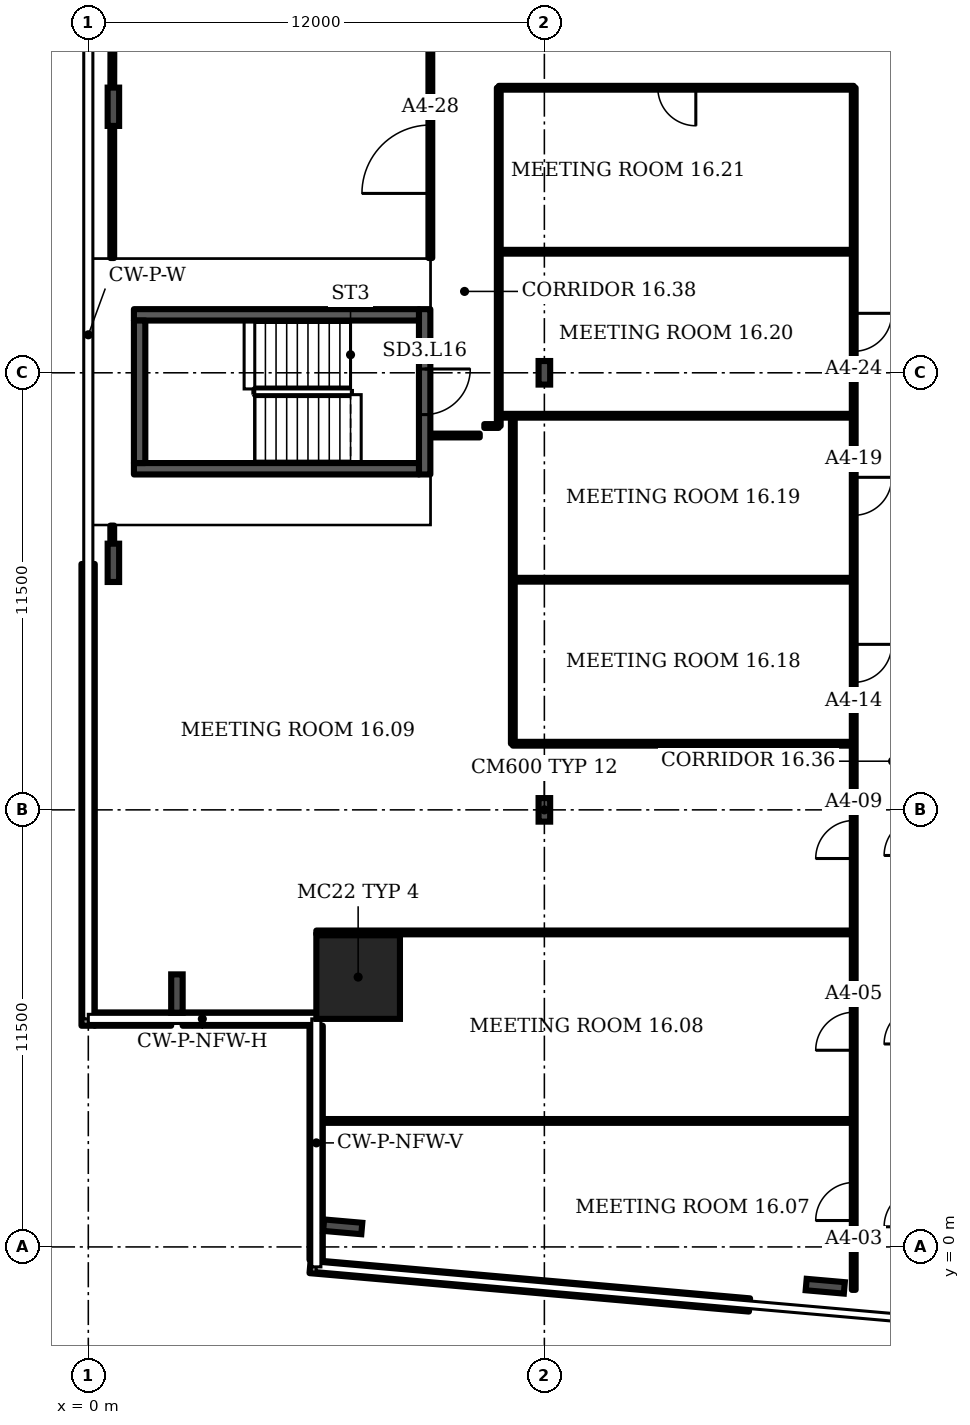
"""IFC4 building model, lengths in metres.
Left out: names, types, materials, properties, quantities, classifications, styles, units other than length and angle.
Written with IfcOpenShell. Run it as: python <this file> out.ifc"""

import sys

from ifc_helpers import new_model, si_unit, direction, frame, frame_2d, origin, origin_2d, place, context, subcontext, project, spatial, rectangle, i_section, extrude, element, fill, save


model = new_model("IFC4")
c1 = context("Model", 3, precision=1e-05, world=origin(), true_north=direction((0.0, 1.0)))
c2 = subcontext(c1, "Body", "Model", "MODEL_VIEW")
j1 = project(units=[si_unit("LENGTHUNIT", "METRE"), si_unit("PLANEANGLEUNIT", "RADIAN")], contexts=[c1])
p1 = place(None, origin())
s1 = spatial("IfcSite", under=j1, at=p1, CompositionType="ELEMENT")
p2 = place(p1, origin())
s2 = spatial("IfcBuilding", under=s1, at=p2, CompositionType="ELEMENT")
p3 = place(p2, frame((0.0, 0.0, 77.5)))
s3 = spatial("IfcBuildingStorey", under=s2, at=p3, CompositionType="ELEMENT", Elevation=77.5)
p4 = place(p3, frame((7.1, 7.1, 0.0), z_axis=(0.0, 0.0, 1.0), x_axis=(1.0, 0.0, 0.0)))
e1 = element("IfcColumn", 1, at=p4, inside=s3, PredefinedType="COLUMN", context=c2, shape_type="SweptSolid", body=[
    extrude(rectangle(XDim=2.2, YDim=2.2, at=origin_2d()), origin(), (0.0, 0.0, 1.0), 3.6),
])
for number, where, z_axis, x_axis in (
    (2, (6.694, 0.529, 0.0), (0.0, 0.0, 1.0), (-0.087, -0.996, 0.0)),
    (3, (19.391, -1.034, 0.0), (0.0, 0.0, 1.0), (-0.087, -0.996, 0.0)),
    (4, (0.66, 30.0, 0.0), (0.0, 0.0, 1.0), (-1.0, 0.0, 0.0)),
    (5, (0.66, 18.0, 0.0), (0.0, 0.0, 1.0), (-1.0, 0.0, 0.0)),
    (6, (2.332, 6.667, 0.0), (0.0, 0.0, 1.0), (-1.0, 0.0, 0.0)),
):
    element("IfcColumn", number, at=place(p3, frame(where, z_axis=z_axis, x_axis=x_axis)), inside=s3, PredefinedType="COLUMN", context=c2, shape_type="SweptSolid", body=[
        extrude(i_section(OverallWidth=0.302, OverallDepth=1.008, WebThickness=0.021, FlangeThickness=0.04, FilletRadius=0.03, at=origin_2d()), origin(), (0.0, 0.0, 1.0), 3.6),
    ])
for number, where, z_axis, x_axis in (
    (7, (12.0, 11.5, 0.0), (0.0, 0.0, 1.0), (1.0, 0.0, 0.0)),
    (8, (12.0, 23.0, 0.0), (0.0, 0.0, 1.0), (1.0, 0.0, 0.0)),
):
    element("IfcColumn", number, at=place(p3, frame(where, z_axis=z_axis, x_axis=x_axis)), inside=s3, PredefinedType="COLUMN", context=c2, shape_type="SweptSolid", body=[
        extrude(i_section(OverallWidth=0.305, OverallDepth=0.62, WebThickness=0.021, FlangeThickness=0.04, FilletRadius=0.027, at=origin_2d()), origin(), (0.0, 0.0, 1.0), 3.6),
    ])
p5 = place(p3, frame((5.835, -0.516, 0.0), z_axis=(0.0, 0.0, 1.0), x_axis=(0.996192, -0.087142, 0.0)))
e9 = element("IfcWall", 9, at=p5, inside=s3, PredefinedType="SOLIDWALL", context=c2, shape_type="SweptSolid", body=[
    extrude(rectangle(XDim=11.607, YDim=0.35, at=frame_2d((5.804, 0.0))), origin(), (0.0, 0.0, 1.0), 1.0),
])
p6 = place(p3, frame((-0.005, 17.97, 0.0), z_axis=(0.0, 0.0, 1.0), x_axis=(0.0, -1.0, 0.0)))
e10 = element("IfcWall", 10, at=p6, inside=s3, PredefinedType="SOLIDWALL", context=c2, shape_type="SweptSolid", body=[
    extrude(rectangle(XDim=12.15, YDim=0.35, at=frame_2d((6.075, 0.0))), origin(), (0.0, 0.0, 1.0), 1.0),
])
p7 = place(p3, frame((0.17, 5.995, 0.0), z_axis=(0.0, 0.0, 1.0), x_axis=(1.0, 0.0, 0.0)))
e11 = element("IfcWall", 11, at=p7, inside=s3, PredefinedType="SOLIDWALL", context=c2, shape_type="SweptSolid", body=[
    extrude(rectangle(XDim=2.011, YDim=0.35, at=frame_2d((1.005, 0.0))), origin(), (0.0, 0.0, 1.0), 1.0),
])
p8 = place(p3, frame((2.483, 5.995, 0.0), z_axis=(0.0, 0.0, 1.0), x_axis=(1.0, 0.0, 0.0)))
e12 = element("IfcWall", 12, at=p8, inside=s3, PredefinedType="SOLIDWALL", context=c2, shape_type="SweptSolid", body=[
    extrude(rectangle(XDim=3.517, YDim=0.35, at=frame_2d((1.759, 0.0))), origin(), (0.0, 0.0, 1.0), 1.0),
])
p9 = place(p3, frame((5.995, 5.82, 0.0), z_axis=(0.0, 0.0, 1.0), x_axis=(0.0, -1.0, 0.0)))
e13 = element("IfcWall", 13, at=p9, inside=s3, PredefinedType="SOLIDWALL", context=c2, shape_type="SweptSolid", body=[
    extrude(rectangle(XDim=6.161, YDim=0.35, at=frame_2d((3.081, 0.0))), origin(), (0.0, 0.0, 1.0), 1.0),
])
p10 = place(p3, frame((8.85, 20.325, 0.0), z_axis=(0.0, 0.0, 1.0), x_axis=(0.0, 1.0, 0.0)))
e14 = element("IfcWall", 14, at=p10, inside=s3, PredefinedType="SHEAR", context=c2, shape_type="SweptSolid", body=[
    extrude(rectangle(XDim=4.35, YDim=0.3, at=frame_2d((2.175, 0.0))), origin(), (0.0, 0.0, 1.0), 3.2),
])
p11 = place(p10, frame((1.575, 0.0, 0.0)))
e15 = element("IfcOpeningElement", 15, at=p11, cuts=e14, PredefinedType="OPENING", context=c2, shape_type="SweptSolid", body=[
    extrude(rectangle(XDim=1.2, YDim=2.1, at=frame_2d((0.6, 1.05))), frame((0.0, 0.16, 0.0), z_axis=(0.0, -1.0, 0.0), x_axis=(1.0, 0.0, 0.0)), (0.0, 0.0, 1.0), 0.32),
])
p12 = place(p3, frame((0.63, 17.5, 0.0), z_axis=(0.0, 0.0, 1.0), x_axis=(0.0, 1.0, 0.0)))
e16 = element("IfcWall", 16, at=p12, inside=s3, PredefinedType="PARTITIONING", context=c2, shape_type="SweptSolid", body=[
    extrude(rectangle(XDim=1.48, YDim=0.1, at=frame_2d((0.74, 0.0))), origin(), (0.0, 0.0, 1.0), 2.58),
])
p13 = place(p3, frame((0.63, 26.02, 0.0), z_axis=(0.0, 0.0, 1.0), x_axis=(0.0, 1.0, 0.0)))
e17 = element("IfcWall", 17, at=p13, inside=s3, PredefinedType="PARTITIONING", context=c2, shape_type="SweptSolid", body=[
    extrude(rectangle(XDim=3.98, YDim=0.1, at=frame_2d((1.99, 0.0))), origin(), (0.0, 0.0, 1.0), 2.58),
])
p14 = place(p3, frame((0.63, 30.0, 0.0), z_axis=(0.0, 0.0, 1.0), x_axis=(0.00218, 0.999994, 0.0)))
e18 = element("IfcWall", 18, at=p14, inside=s3, PredefinedType="PARTITIONING", context=c2, shape_type="SweptSolid", body=[
    extrude(rectangle(XDim=11.535, YDim=0.1, at=frame_2d((5.768, 0.0))), origin(), (0.0, 0.0, 1.0), 2.58),
])
p15 = place(p3, frame((6.0, 8.275, 0.0), z_axis=(0.0, 0.0, 1.0), x_axis=(1.0, 0.0, 0.0)))
e19 = element("IfcWall", 19, at=p15, inside=s3, PredefinedType="PARTITIONING", context=c2, shape_type="SweptSolid", body=[
    extrude(rectangle(XDim=14.14, YDim=0.1, at=frame_2d((7.07, 0.0))), origin(), (0.0, 0.0, 1.0), 3.2),
])
p16 = place(p3, frame((6.02, 3.315, 0.0), z_axis=(0.0, 0.0, 1.0), x_axis=(1.0, 0.0, 0.0)))
e20 = element("IfcWall", 20, at=p16, inside=s3, PredefinedType="PARTITIONING", context=c2, shape_type="SweptSolid", body=[
    extrude(rectangle(XDim=14.12, YDim=0.1, at=frame_2d((7.06, 0.0))), origin(), (0.0, 0.0, 1.0), 3.2),
])
p17 = place(p3, frame((9.0, 26.02, 0.0), z_axis=(0.0, 0.0, 1.0), x_axis=(0.0, 1.0, 0.0)))
e21 = element("IfcWall", 21, at=p17, inside=s3, PredefinedType="PARTITIONING", context=c2, shape_type="SweptSolid", body=[
    extrude(rectangle(XDim=7.96, YDim=0.1, at=frame_2d((3.98, 0.0))), origin(), (0.0, 0.0, 1.0), 3.2),
])
p18 = place(p17, frame((1.7, 0.0, 0.0)))
e22 = element("IfcOpeningElement", 22, at=p18, cuts=e21, PredefinedType="OPENING", context=c2, shape_type="SweptSolid", body=[
    extrude(rectangle(XDim=1.8, YDim=2.1, at=frame_2d((0.9, 1.05))), frame((0.0, 0.06, 0.0), z_axis=(0.0, -1.0, 0.0), x_axis=(1.0, 0.0, 0.0)), (0.0, 0.0, 1.0), 0.12),
])
p19 = place(p3, frame((9.02, 21.35, 0.0), z_axis=(0.0, 0.0, 1.0), x_axis=(1.0, 0.0, 0.0)))
e23 = element("IfcWall", 23, at=p19, inside=s3, PredefinedType="PARTITIONING", context=c2, shape_type="SweptSolid", body=[
    extrude(rectangle(XDim=1.28, YDim=0.1, at=frame_2d((0.64, 0.0))), origin(), (0.0, 0.0, 1.0), 3.2),
])
p20 = place(p3, frame((10.42, 21.6, 0.0), z_axis=(0.0, 0.0, 1.0), x_axis=(1.0, 0.0, 0.0)))
e24 = element("IfcWall", 24, at=p20, inside=s3, PredefinedType="PARTITIONING", context=c2, shape_type="SweptSolid", body=[
    extrude(rectangle(XDim=0.38, YDim=0.1, at=frame_2d((0.19, 0.0))), origin(), (0.0, 0.0, 1.0), 3.2),
])
p21 = place(p3, frame((10.8, 21.6, 0.0), z_axis=(0.0, 0.0, 1.0), x_axis=(0.0, 1.0, 0.0)))
e25 = element("IfcWall", 25, at=p21, inside=s3, PredefinedType="PARTITIONING", context=c2, shape_type="SweptSolid", body=[
    extrude(rectangle(XDim=8.9, YDim=0.1, at=frame_2d((4.45, 0.0))), origin(), (0.0, 0.0, 1.0), 3.2),
])
for number, where, z_axis, x_axis in (
    (26, (10.8, 21.87, 0.0), (0.0, 0.0, 1.0), (1.0, 0.0, 0.0)),
    (27, (10.8, 26.185, 0.0), (0.0, 0.0, 1.0), (1.0, 0.0, 0.0)),
):
    element("IfcWall", number, at=place(p3, frame(where, z_axis=z_axis, x_axis=x_axis)), inside=s3, PredefinedType="PARTITIONING", context=c2, shape_type="SweptSolid", body=[
        extrude(rectangle(XDim=9.34, YDim=0.1, at=frame_2d((4.67, 0.0))), origin(), (0.0, 0.0, 1.0), 3.2),
    ])
p22 = place(p3, frame((10.8, 30.5, 0.0), z_axis=(0.0, 0.0, 1.0), x_axis=(1.0, 0.0, 0.0)))
e28 = element("IfcWall", 28, at=p22, inside=s3, PredefinedType="PARTITIONING", context=c2, shape_type="SweptSolid", body=[
    extrude(rectangle(XDim=9.34, YDim=0.1, at=frame_2d((4.67, 0.0))), origin(), (0.0, 0.0, 1.0), 3.2),
])
p23 = place(p22, frame((4.185, 0.0, 0.0)))
e29 = element("IfcOpeningElement", 29, at=p23, cuts=e28, PredefinedType="OPENING", context=c2, shape_type="SweptSolid", body=[
    extrude(rectangle(XDim=1.0, YDim=2.1, at=frame_2d((0.5, 1.05))), frame((0.0, 0.06, 0.0), z_axis=(0.0, -1.0, 0.0), x_axis=(1.0, 0.0, 0.0)), (0.0, 0.0, 1.0), 0.12),
])
p24 = place(p3, frame((11.17, 13.24, 0.0), z_axis=(0.0, 0.0, 1.0), x_axis=(0.0, 1.0, 0.0)))
e30 = element("IfcWall", 30, at=p24, inside=s3, PredefinedType="PARTITIONING", context=c2, shape_type="SweptSolid", body=[
    extrude(rectangle(XDim=8.63, YDim=0.1, at=frame_2d((4.315, 0.0))), origin(), (0.0, 0.0, 1.0), 3.2),
])
for number, where, z_axis, x_axis in (
    (31, (11.17, 13.24, 0.0), (0.0, 0.0, 1.0), (1.0, 0.0, 0.0)),
    (32, (11.17, 17.555, 0.0), (0.0, 0.0, 1.0), (1.0, 0.0, 0.0)),
):
    element("IfcWall", number, at=place(p3, frame(where, z_axis=z_axis, x_axis=x_axis)), inside=s3, PredefinedType="PARTITIONING", context=c2, shape_type="SweptSolid", body=[
        extrude(rectangle(XDim=8.97, YDim=0.1, at=frame_2d((4.485, 0.0))), origin(), (0.0, 0.0, 1.0), 3.2),
    ])
p25 = place(p3, frame((20.14, -1.13, 0.0), z_axis=(0.0, 0.0, 1.0), x_axis=(0.0, 1.0, 0.0)))
e33 = element("IfcWall", 33, at=p25, inside=s3, PredefinedType="PARTITIONING", context=c2, shape_type="SweptSolid", body=[
    extrude(rectangle(XDim=31.63, YDim=0.1, at=frame_2d((15.815, 0.0))), origin(), (0.0, 0.0, 1.0), 3.2),
])
p26 = place(p25, frame((1.825, 0.0, 0.0)))
e34 = element("IfcOpeningElement", 34, at=p26, cuts=e33, PredefinedType="OPENING", context=c2, shape_type="SweptSolid", body=[
    extrude(rectangle(XDim=1.0, YDim=2.1, at=frame_2d((0.5, 1.05))), frame((0.0, 0.06, 0.0), z_axis=(0.0, -1.0, 0.0), x_axis=(1.0, 0.0, 0.0)), (0.0, 0.0, 1.0), 0.12),
])
p27 = place(p25, frame((6.305, 0.0, 0.0)))
e35 = element("IfcOpeningElement", 35, at=p27, cuts=e33, PredefinedType="OPENING", context=c2, shape_type="SweptSolid", body=[
    extrude(rectangle(XDim=1.0, YDim=2.1, at=frame_2d((0.5, 1.05))), frame((0.0, 0.06, 0.0), z_axis=(0.0, -1.0, 0.0), x_axis=(1.0, 0.0, 0.0)), (0.0, 0.0, 1.0), 0.12),
])
p28 = place(p25, frame((11.35, 0.0, 0.0)))
e36 = element("IfcOpeningElement", 36, at=p28, cuts=e33, PredefinedType="OPENING", context=c2, shape_type="SweptSolid", body=[
    extrude(rectangle(XDim=1.0, YDim=2.1, at=frame_2d((0.5, 1.05))), frame((0.0, 0.06, 0.0), z_axis=(0.0, -1.0, 0.0), x_axis=(1.0, 0.0, 0.0)), (0.0, 0.0, 1.0), 0.12),
])
p29 = place(p25, frame((15.985, 0.0, 0.0)))
e37 = element("IfcOpeningElement", 37, at=p29, cuts=e33, PredefinedType="OPENING", context=c2, shape_type="SweptSolid", body=[
    extrude(rectangle(XDim=1.0, YDim=2.1, at=frame_2d((0.5, 1.05))), frame((0.0, 0.06, 0.0), z_axis=(0.0, -1.0, 0.0), x_axis=(1.0, 0.0, 0.0)), (0.0, 0.0, 1.0), 0.12),
])
p30 = place(p25, frame((20.38, 0.0, 0.0)))
e38 = element("IfcOpeningElement", 38, at=p30, cuts=e33, PredefinedType="OPENING", context=c2, shape_type="SweptSolid", body=[
    extrude(rectangle(XDim=1.0, YDim=2.1, at=frame_2d((0.5, 1.05))), frame((0.0, 0.06, 0.0), z_axis=(0.0, -1.0, 0.0), x_axis=(1.0, 0.0, 0.0)), (0.0, 0.0, 1.0), 0.12),
])
p31 = place(p25, frame((24.695, 0.0, 0.0)))
e39 = element("IfcOpeningElement", 39, at=p31, cuts=e33, PredefinedType="OPENING", context=c2, shape_type="SweptSolid", body=[
    extrude(rectangle(XDim=1.0, YDim=2.1, at=frame_2d((0.5, 1.05))), frame((0.0, 0.06, 0.0), z_axis=(0.0, -1.0, 0.0), x_axis=(1.0, 0.0, 0.0)), (0.0, 0.0, 1.0), 0.12),
])
for number, where, z_axis, x_axis in (
    (40, (1.2, 20.475, 0.0), (0.0, 0.0, 1.0), (1.0, 0.0, 0.0)),
    (41, (1.2, 24.525, 0.0), (0.0, 0.0, 1.0), (1.0, 0.0, 0.0)),
):
    element("IfcWall", number, at=place(p3, frame(where, z_axis=z_axis, x_axis=x_axis)), inside=s3, PredefinedType="SHEAR", context=c2, shape_type="SweptSolid", body=[
        extrude(rectangle(XDim=7.5, YDim=0.3, at=frame_2d((3.75, 0.0))), origin(), (0.0, 0.0, 1.0), 3.2),
    ])
p32 = place(p3, frame((1.35, 20.625, 0.0), z_axis=(0.0, 0.0, 1.0), x_axis=(0.0, 1.0, 0.0)))
e42 = element("IfcWall", 42, at=p32, inside=s3, PredefinedType="SHEAR", context=c2, shape_type="SweptSolid", body=[
    extrude(rectangle(XDim=3.75, YDim=0.3, at=frame_2d((1.875, 0.0))), origin(), (0.0, 0.0, 1.0), 3.2),
])
p33 = place(p11, origin())
e43 = element("IfcDoor", 43, at=p33, inside=s3, OperationType="SINGLE_SWING_RIGHT", PredefinedType="DOOR", context=c2, shape_type="SweptSolid", body=[
    extrude(rectangle(XDim=1.2, YDim=2.1, at=frame_2d((0.6, 1.05))), frame((0.0, 0.025, 0.0), z_axis=(0.0, -1.0, 0.0), x_axis=(1.0, 0.0, 0.0)), (0.0, 0.0, 1.0), 0.05),
])
fill(e15, e43)
p34 = place(p26, origin())
e44 = element("IfcDoor", 44, at=p34, inside=s3, OperationType="SINGLE_SWING_LEFT", PredefinedType="DOOR", context=c2, shape_type="SweptSolid", body=[
    extrude(rectangle(XDim=1.0, YDim=2.1, at=frame_2d((0.5, 1.05))), frame((0.0, 0.025, 0.0), z_axis=(0.0, -1.0, 0.0), x_axis=(1.0, 0.0, 0.0)), (0.0, 0.0, 1.0), 0.05),
])
fill(e34, e44)
p35 = place(p27, origin())
e45 = element("IfcDoor", 45, at=p35, inside=s3, OperationType="SINGLE_SWING_LEFT", PredefinedType="DOOR", context=c2, shape_type="SweptSolid", body=[
    extrude(rectangle(XDim=1.0, YDim=2.1, at=frame_2d((0.5, 1.05))), frame((0.0, 0.025, 0.0), z_axis=(0.0, -1.0, 0.0), x_axis=(1.0, 0.0, 0.0)), (0.0, 0.0, 1.0), 0.05),
])
fill(e35, e45)
p36 = place(p28, origin())
e46 = element("IfcDoor", 46, at=p36, inside=s3, OperationType="SINGLE_SWING_LEFT", PredefinedType="DOOR", context=c2, shape_type="SweptSolid", body=[
    extrude(rectangle(XDim=1.0, YDim=2.1, at=frame_2d((0.5, 1.05))), frame((0.0, 0.025, 0.0), z_axis=(0.0, -1.0, 0.0), x_axis=(1.0, 0.0, 0.0)), (0.0, 0.0, 1.0), 0.05),
])
fill(e36, e46)
p37 = place(p29, origin())
e47 = element("IfcDoor", 47, at=p37, inside=s3, OperationType="SINGLE_SWING_RIGHT", PredefinedType="DOOR", context=c2, shape_type="SweptSolid", body=[
    extrude(rectangle(XDim=1.0, YDim=2.1, at=frame_2d((0.5, 1.05))), frame((0.0, 0.025, 0.0), z_axis=(0.0, -1.0, 0.0), x_axis=(1.0, 0.0, 0.0)), (0.0, 0.0, 1.0), 0.05),
])
fill(e37, e47)
p38 = place(p30, origin())
e48 = element("IfcDoor", 48, at=p38, inside=s3, OperationType="SINGLE_SWING_RIGHT", PredefinedType="DOOR", context=c2, shape_type="SweptSolid", body=[
    extrude(rectangle(XDim=1.0, YDim=2.1, at=frame_2d((0.5, 1.05))), frame((0.0, 0.025, 0.0), z_axis=(0.0, -1.0, 0.0), x_axis=(1.0, 0.0, 0.0)), (0.0, 0.0, 1.0), 0.05),
])
fill(e38, e48)
p39 = place(p31, origin())
e49 = element("IfcDoor", 49, at=p39, inside=s3, OperationType="SINGLE_SWING_RIGHT", PredefinedType="DOOR", context=c2, shape_type="SweptSolid", body=[
    extrude(rectangle(XDim=1.0, YDim=2.1, at=frame_2d((0.5, 1.05))), frame((0.0, 0.025, 0.0), z_axis=(0.0, -1.0, 0.0), x_axis=(1.0, 0.0, 0.0)), (0.0, 0.0, 1.0), 0.05),
])
fill(e39, e49)
p40 = place(p18, origin())
e50 = element("IfcDoor", 50, at=p40, inside=s3, OperationType="DOUBLE_DOOR_SINGLE_SWING", PredefinedType="DOOR", context=c2, shape_type="SweptSolid", body=[
    extrude(rectangle(XDim=1.8, YDim=2.1, at=frame_2d((0.9, 1.05))), frame((0.0, 0.025, 0.0), z_axis=(0.0, -1.0, 0.0), x_axis=(1.0, 0.0, 0.0)), (0.0, 0.0, 1.0), 0.05),
])
fill(e22, e50)
p41 = place(p23, origin())
e51 = element("IfcDoor", 51, at=p41, inside=s3, OperationType="SINGLE_SWING_RIGHT", PredefinedType="DOOR", context=c2, shape_type="SweptSolid", body=[
    extrude(rectangle(XDim=1.0, YDim=2.1, at=frame_2d((0.5, 1.05))), frame((0.0, 0.025, 0.0), z_axis=(0.0, -1.0, 0.0), x_axis=(1.0, 0.0, 0.0)), (0.0, 0.0, 1.0), 0.05),
])
fill(e29, e51)
save(model, sys.argv[1])
